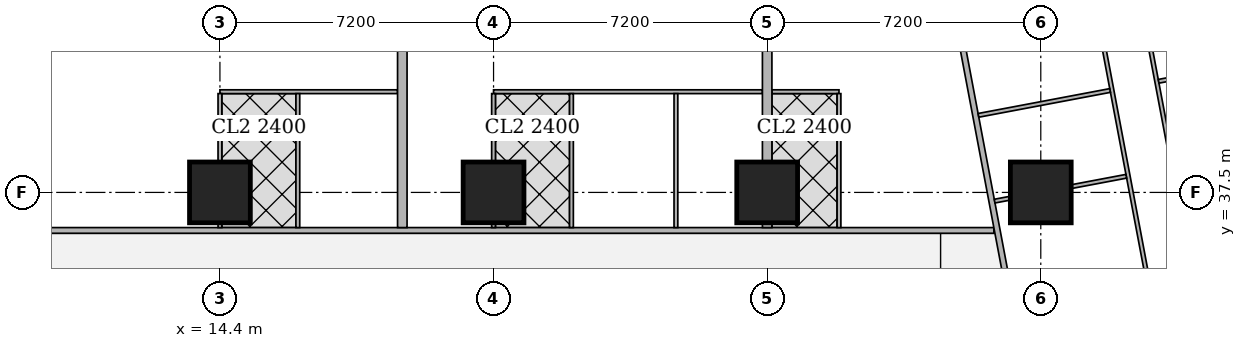
"""IFC4 building model, lengths in metres.
Left out: names, types, materials, properties, quantities, classifications, styles, units other than length and angle.
Written with IfcOpenShell. Run it as: python <this file> out.ifc"""

import sys

from ifc_helpers import new_model, si_unit, direction, frame, frame_2d, origin, origin_2d, place, context, subcontext, project, spatial, rectangle, extrude, element, fill, save


model = new_model("IFC4")
c1 = context("Model", 3, precision=1e-05, world=origin(), true_north=direction((0.0, 1.0)))
c2 = subcontext(c1, "Body", "Model", "MODEL_VIEW")
j1 = project(units=[si_unit("LENGTHUNIT", "METRE"), si_unit("PLANEANGLEUNIT", "RADIAN")], contexts=[c1])
p1 = place(None, origin())
s1 = spatial("IfcSite", under=j1, at=p1, CompositionType="ELEMENT")
p2 = place(p1, origin())
s2 = spatial("IfcBuilding", under=s1, at=p2, CompositionType="ELEMENT")
p3 = place(p2, frame((0.0, 0.0, 111.65)))
s3 = spatial("IfcBuildingStorey", under=s2, at=p3, CompositionType="ELEMENT", Elevation=111.65)
for number, where, z_axis, x_axis in (
    (1, (14.4, 37.5, 0.0), (0.0, 0.0, 1.0), (1.0, 0.0, 0.0)),
    (2, (21.6, 37.5, 0.0), (0.0, 0.0, 1.0), (1.0, 0.0, 0.0)),
    (3, (28.8, 37.5, 0.0), (0.0, 0.0, 1.0), (1.0, 0.0, 0.0)),
    (4, (36.0, 37.5, 0.0), (0.0, 0.0, 1.0), (1.0, 0.0, 0.0)),
):
    element("IfcColumn", number, at=place(p3, frame(where, z_axis=z_axis, x_axis=x_axis)), inside=s3, PredefinedType="COLUMN", context=c2, shape_type="SweptSolid", body=[
        extrude(rectangle(XDim=1.6, YDim=1.6, at=origin_2d()), origin(), (0.0, 0.0, 1.0), 3.75),
    ])
p4 = place(p3, frame((8.35, 36.5, 0.0), z_axis=(0.0, 0.0, 1.0), x_axis=(1.0, 0.0, 0.0)))
e5 = element("IfcWall", 5, at=p4, inside=s3, PredefinedType="SOLIDWALL", context=c2, shape_type="SweptSolid", body=[
    extrude(rectangle(XDim=26.415, YDim=0.15, at=frame_2d((13.208, 0.0))), origin(), (0.0, 0.0, 1.0), 3.5),
])
p5 = place(p4, frame((2.6, 0.0, 0.0)))
e6 = element("IfcOpeningElement", 6, at=p5, cuts=e5, PredefinedType="OPENING", context=c2, shape_type="SweptSolid", body=[
    extrude(rectangle(XDim=1.0, YDim=2.1, at=frame_2d((0.5, 1.05))), frame((0.0, 0.085, 0.0), z_axis=(0.0, -1.0, 0.0), x_axis=(1.0, 0.0, 0.0)), (0.0, 0.0, 1.0), 0.17),
])
p6 = place(p4, frame((10.949, 0.0, 0.0)))
e7 = element("IfcOpeningElement", 7, at=p6, cuts=e5, PredefinedType="OPENING", context=c2, shape_type="SweptSolid", body=[
    extrude(rectangle(XDim=1.0, YDim=2.1, at=frame_2d((0.5, 1.05))), frame((0.0, 0.085, 0.0), z_axis=(0.0, -1.0, 0.0), x_axis=(1.0, 0.0, 0.0)), (0.0, 0.0, 1.0), 0.17),
])
p7 = place(p4, frame((23.923, 0.0, 0.0)))
e8 = element("IfcOpeningElement", 8, at=p7, cuts=e5, PredefinedType="OPENING", context=c2, shape_type="SweptSolid", body=[
    extrude(rectangle(XDim=1.0, YDim=2.1, at=frame_2d((0.5, 1.05))), frame((0.0, 0.085, 0.0), z_axis=(0.0, -1.0, 0.0), x_axis=(1.0, 0.0, 0.0)), (0.0, 0.0, 1.0), 0.17),
])
p8 = place(p3, frame((33.127, 45.65, 0.0), z_axis=(0.0, 0.0, 1.0), x_axis=(0.185598547723, -0.98262565562, 0.0)))
e9 = element("IfcWall", 9, at=p8, inside=s3, PredefinedType="SOLIDWALL", context=c2, shape_type="SweptSolid", body=[
    extrude(rectangle(XDim=47.118, YDim=0.15, at=frame_2d((23.559, 0.0))), origin(), (0.0, 0.0, 1.0), 2.2),
])
p9 = place(p8, frame((20.373, 0.0, 0.0)))
e10 = element("IfcOpeningElement", 10, at=p9, cuts=e9, PredefinedType="OPENING", context=c2, shape_type="SweptSolid", body=[
    extrude(rectangle(XDim=1.0, YDim=2.1, at=frame_2d((0.5, 1.05))), frame((0.0, 0.085, 0.0), z_axis=(0.0, -1.0, 0.0), x_axis=(1.0, 0.0, 0.0)), (0.0, 0.0, 1.0), 0.17),
])
p10 = place(p8, frame((24.188, 0.0, 0.0)))
e11 = element("IfcOpeningElement", 11, at=p10, cuts=e9, PredefinedType="OPENING", context=c2, shape_type="SweptSolid", body=[
    extrude(rectangle(XDim=1.0, YDim=2.1, at=frame_2d((0.5, 1.05))), frame((0.0, 0.085, 0.0), z_axis=(0.0, -1.0, 0.0), x_axis=(1.0, 0.0, 0.0)), (0.0, 0.0, 1.0), 0.17),
])
p11 = place(p8, frame((32.608, 0.0, 0.0)))
e12 = element("IfcOpeningElement", 12, at=p11, cuts=e9, PredefinedType="OPENING", context=c2, shape_type="SweptSolid", body=[
    extrude(rectangle(XDim=1.0, YDim=2.1, at=frame_2d((0.5, 1.05))), frame((0.0, 0.085, 0.0), z_axis=(0.0, -1.0, 0.0), x_axis=(1.0, 0.0, 0.0)), (0.0, 0.0, 1.0), 0.17),
])
p12 = place(p3, frame((38.862, 41.42, 0.0), z_axis=(0.0, 0.0, 1.0), x_axis=(0.185550092293, -0.982634806655, 0.0)))
e13 = element("IfcWall", 13, at=p12, inside=s3, PredefinedType="PARTITIONING", context=c2, shape_type="SweptSolid", body=[
    extrude(rectangle(XDim=12.384, YDim=0.1, at=frame_2d((6.192, 0.0))), origin(), (0.0, 0.0, 1.0), 2.5),
])
p13 = place(p12, frame((11.212, 0.0, 0.0)))
e14 = element("IfcOpeningElement", 14, at=p13, cuts=e13, PredefinedType="OPENING", context=c2, shape_type="SweptSolid", body=[
    extrude(rectangle(XDim=0.9, YDim=2.1, at=frame_2d((0.45, 1.05))), frame((0.0, 0.06, 0.0), z_axis=(0.0, -1.0, 0.0), x_axis=(1.0, 0.0, 0.0)), (0.0, 0.0, 1.0), 0.12),
])
p14 = place(p12, frame((7.555, 0.0, 0.0)))
e15 = element("IfcOpeningElement", 15, at=p14, cuts=e13, PredefinedType="OPENING", context=c2, shape_type="SweptSolid", body=[
    extrude(rectangle(XDim=0.9, YDim=2.1, at=frame_2d((0.45, 1.05))), frame((0.0, 0.06, 0.0), z_axis=(0.0, -1.0, 0.0), x_axis=(1.0, 0.0, 0.0)), (0.0, 0.0, 1.0), 0.12),
])
p15 = place(p12, frame((3.579, 0.0, 0.0)))
e16 = element("IfcOpeningElement", 16, at=p15, cuts=e13, PredefinedType="OPENING", context=c2, shape_type="SweptSolid", body=[
    extrude(rectangle(XDim=0.9, YDim=2.1, at=frame_2d((0.45, 1.05))), frame((0.0, 0.06, 0.0), z_axis=(0.0, -1.0, 0.0), x_axis=(1.0, 0.0, 0.0)), (0.0, 0.0, 1.0), 0.12),
])
p16 = place(p3, frame((37.473, 42.309, 0.0), z_axis=(0.0, 0.0, 1.0), x_axis=(0.185583982986, -0.982628406499, 0.0)))
e17 = element("IfcWall", 17, at=p16, inside=s3, PredefinedType="PARTITIONING", context=c2, shape_type="SweptSolid", body=[
    extrude(rectangle(XDim=14.825, YDim=0.1, at=frame_2d((7.412, 0.0))), origin(), (0.0, 0.0, 1.0), 2.5),
])
p17 = place(p16, frame((13.4, 0.0, 0.0)))
e18 = element("IfcOpeningElement", 18, at=p17, cuts=e17, PredefinedType="OPENING", context=c2, shape_type="SweptSolid", body=[
    extrude(rectangle(XDim=0.9, YDim=2.1, at=frame_2d((0.45, 1.05))), frame((0.0, 0.06, 0.0), z_axis=(0.0, -1.0, 0.0), x_axis=(1.0, 0.0, 0.0)), (0.0, 0.0, 1.0), 0.12),
])
p18 = place(p16, frame((9.808, 0.0, 0.0)))
e19 = element("IfcOpeningElement", 19, at=p18, cuts=e17, PredefinedType="OPENING", context=c2, shape_type="SweptSolid", body=[
    extrude(rectangle(XDim=0.9, YDim=2.1, at=frame_2d((0.45, 1.05))), frame((0.0, 0.06, 0.0), z_axis=(0.0, -1.0, 0.0), x_axis=(1.0, 0.0, 0.0)), (0.0, 0.0, 1.0), 0.12),
])
p19 = place(p16, frame((5.397, 0.0, 0.0)))
e20 = element("IfcOpeningElement", 20, at=p19, cuts=e17, PredefinedType="OPENING", context=c2, shape_type="SweptSolid", body=[
    extrude(rectangle(XDim=0.9, YDim=2.1, at=frame_2d((0.45, 1.05))), frame((0.0, 0.06, 0.0), z_axis=(0.0, -1.0, 0.0), x_axis=(1.0, 0.0, 0.0)), (0.0, 0.0, 1.0), 0.12),
])
p20 = place(p16, frame((2.853, 0.0, 0.0)))
e21 = element("IfcOpeningElement", 21, at=p20, cuts=e17, PredefinedType="OPENING", context=c2, shape_type="SweptSolid", body=[
    extrude(rectangle(XDim=0.9, YDim=2.1, at=frame_2d((0.45, 1.05))), frame((0.0, 0.06, 0.0), z_axis=(0.0, -1.0, 0.0), x_axis=(1.0, 0.0, 0.0)), (0.0, 0.0, 1.0), 0.12),
])
p21 = place(p16, frame((11.491, 0.0, 0.0)))
e22 = element("IfcOpeningElement", 22, at=p21, cuts=e17, PredefinedType="OPENING", context=c2, shape_type="SweptSolid", body=[
    extrude(rectangle(XDim=0.9, YDim=2.1, at=frame_2d((0.45, 1.05))), frame((0.0, 0.06, 0.0), z_axis=(0.0, -1.0, 0.0), x_axis=(1.0, 0.0, 0.0)), (0.0, 0.0, 1.0), 0.12),
])
p22 = place(p16, frame((7.9, 0.0, 0.0)))
e23 = element("IfcOpeningElement", 23, at=p22, cuts=e17, PredefinedType="OPENING", context=c2, shape_type="SweptSolid", body=[
    extrude(rectangle(XDim=0.9, YDim=2.1, at=frame_2d((0.45, 1.05))), frame((0.0, 0.06, 0.0), z_axis=(0.0, -1.0, 0.0), x_axis=(1.0, 0.0, 0.0)), (0.0, 0.0, 1.0), 0.12),
])
p23 = place(p3, frame((43.277, 41.212, 0.0), z_axis=(0.0, 0.0, 1.0), x_axis=(-0.982665405803, -0.185387972203, 0.0)))
e24 = element("IfcWall", 24, at=p23, inside=s3, PredefinedType="PARTITIONING", context=c2, shape_type="SweptSolid", body=[
    extrude(rectangle(XDim=4.25, YDim=0.1, at=frame_2d((2.125, 0.0))), origin(), (0.0, 0.0, 1.0), 2.05),
])
p24 = place(p3, frame((37.824, 40.182, 0.0), z_axis=(0.0, 0.0, 1.0), x_axis=(-0.982648794755, -0.185475998897, 0.0)))
e25 = element("IfcWall", 25, at=p24, inside=s3, PredefinedType="PARTITIONING", context=c2, shape_type="SweptSolid", body=[
    extrude(rectangle(XDim=3.525, YDim=0.1, at=frame_2d((1.763, 0.0))), origin(), (0.0, 0.0, 1.0), 3.5),
])
p25 = place(p3, frame((38.25, 37.925, 0.0), z_axis=(0.0, 0.0, 1.0), x_axis=(-0.982626127294, -0.185596050493, 0.0)))
e26 = element("IfcWall", 26, at=p25, inside=s3, PredefinedType="PARTITIONING", context=c2, shape_type="SweptSolid", body=[
    extrude(rectangle(XDim=1.465, YDim=0.1, at=frame_2d((0.733, 0.0))), origin(), (0.0, 0.0, 1.0), 3.5),
])
p26 = place(p3, frame((35.19, 37.347, 0.0), z_axis=(0.0, 0.0, 1.0), x_axis=(-0.982798158448, -0.184682916784, 0.0)))
e27 = element("IfcWall", 27, at=p26, inside=s3, PredefinedType="PARTITIONING", context=c2, shape_type="SweptSolid", body=[
    extrude(rectangle(XDim=0.411, YDim=0.1, at=frame_2d((0.206, 0.0))), origin(), (0.0, 0.0, 1.0), 3.5),
])
p27 = place(p3, frame((14.4, 40.15, 0.0), z_axis=(0.0, 0.0, 1.0), x_axis=(1.0, 0.0, 0.0)))
e28 = element("IfcWall", 28, at=p27, inside=s3, PredefinedType="PARTITIONING", context=c2, shape_type="SweptSolid", body=[
    extrude(rectangle(XDim=4.674, YDim=0.1, at=frame_2d((2.337, 0.0))), origin(), (0.0, 0.0, 1.0), 3.5),
])
p28 = place(p27, frame((0.575, 0.0, 0.0)))
e29 = element("IfcOpeningElement", 29, at=p28, cuts=e28, PredefinedType="OPENING", context=c2, shape_type="SweptSolid", body=[
    extrude(rectangle(XDim=0.9, YDim=2.1, at=frame_2d((0.45, 1.05))), frame((0.0, 0.06, 0.0), z_axis=(0.0, -1.0, 0.0), x_axis=(1.0, 0.0, 0.0)), (0.0, 0.0, 1.0), 0.12),
])
p29 = place(p27, frame((2.975, 0.0, 0.0)))
e30 = element("IfcOpeningElement", 30, at=p29, cuts=e28, PredefinedType="OPENING", context=c2, shape_type="SweptSolid", body=[
    extrude(rectangle(XDim=0.9, YDim=2.1, at=frame_2d((0.45, 1.05))), frame((0.0, 0.06, 0.0), z_axis=(0.0, -1.0, 0.0), x_axis=(1.0, 0.0, 0.0)), (0.0, 0.0, 1.0), 0.12),
])
p30 = place(p3, frame((14.4, 36.575, 0.0), z_axis=(0.0, 0.0, 1.0), x_axis=(0.0, 1.0, 0.0)))
e31 = element("IfcWall", 31, at=p30, inside=s3, PredefinedType="PARTITIONING", context=c2, shape_type="SweptSolid", body=[
    extrude(rectangle(XDim=0.124, YDim=0.1, at=frame_2d((0.062, 0.0))), origin(), (0.0, 0.0, 1.0), 3.5),
])
p31 = place(p3, frame((14.4, 38.301, 0.0), z_axis=(0.0, 0.0, 1.0), x_axis=(0.0, 1.0, 0.0)))
e32 = element("IfcWall", 32, at=p31, inside=s3, PredefinedType="PARTITIONING", context=c2, shape_type="SweptSolid", body=[
    extrude(rectangle(XDim=1.799, YDim=0.1, at=frame_2d((0.899, 0.0))), origin(), (0.0, 0.0, 1.0), 3.5),
])
p32 = place(p3, frame((16.45, 36.575, 0.0), z_axis=(0.0, 0.0, 1.0), x_axis=(0.0, 1.0, 0.0)))
e33 = element("IfcWall", 33, at=p32, inside=s3, PredefinedType="PARTITIONING", context=c2, shape_type="SweptSolid", body=[
    extrude(rectangle(XDim=3.525, YDim=0.1, at=frame_2d((1.763, 0.0))), origin(), (0.0, 0.0, 1.0), 3.5),
])
p33 = place(p3, frame((21.6, 40.15, 0.0), z_axis=(0.0, 0.0, 1.0), x_axis=(1.0, 0.0, 0.0)))
e34 = element("IfcWall", 34, at=p33, inside=s3, PredefinedType="PARTITIONING", context=c2, shape_type="SweptSolid", body=[
    extrude(rectangle(XDim=7.075, YDim=0.1, at=frame_2d((3.538, 0.0))), origin(), (0.0, 0.0, 1.0), 3.5),
])
p34 = place(p33, frame((0.575, 0.0, 0.0)))
e35 = element("IfcOpeningElement", 35, at=p34, cuts=e34, PredefinedType="OPENING", context=c2, shape_type="SweptSolid", body=[
    extrude(rectangle(XDim=0.9, YDim=2.1, at=frame_2d((0.45, 1.05))), frame((0.0, 0.06, 0.0), z_axis=(0.0, -1.0, 0.0), x_axis=(1.0, 0.0, 0.0)), (0.0, 0.0, 1.0), 0.12),
])
p35 = place(p33, frame((5.549, 0.0, 0.0)))
e36 = element("IfcOpeningElement", 36, at=p35, cuts=e34, PredefinedType="OPENING", context=c2, shape_type="SweptSolid", body=[
    extrude(rectangle(XDim=0.9, YDim=2.1, at=frame_2d((0.45, 1.05))), frame((0.0, 0.06, 0.0), z_axis=(0.0, -1.0, 0.0), x_axis=(1.0, 0.0, 0.0)), (0.0, 0.0, 1.0), 0.12),
])
p36 = place(p33, frame((2.974, 0.0, 0.0)))
e37 = element("IfcOpeningElement", 37, at=p36, cuts=e34, PredefinedType="OPENING", context=c2, shape_type="SweptSolid", body=[
    extrude(rectangle(XDim=0.9, YDim=2.1, at=frame_2d((0.45, 1.05))), frame((0.0, 0.06, 0.0), z_axis=(0.0, -1.0, 0.0), x_axis=(1.0, 0.0, 0.0)), (0.0, 0.0, 1.0), 0.12),
])
p37 = place(p3, frame((21.6, 36.575, 0.0), z_axis=(0.0, 0.0, 1.0), x_axis=(0.0, 1.0, 0.0)))
e38 = element("IfcWall", 38, at=p37, inside=s3, PredefinedType="PARTITIONING", context=c2, shape_type="SweptSolid", body=[
    extrude(rectangle(XDim=0.124, YDim=0.1, at=frame_2d((0.062, 0.0))), origin(), (0.0, 0.0, 1.0), 3.5),
])
p38 = place(p3, frame((21.6, 38.301, 0.0), z_axis=(0.0, 0.0, 1.0), x_axis=(0.0, 1.0, 0.0)))
e39 = element("IfcWall", 39, at=p38, inside=s3, PredefinedType="PARTITIONING", context=c2, shape_type="SweptSolid", body=[
    extrude(rectangle(XDim=1.799, YDim=0.1, at=frame_2d((0.899, 0.0))), origin(), (0.0, 0.0, 1.0), 3.5),
])
for number, where, z_axis, x_axis in (
    (40, (26.399, 36.575, 0.0), (0.0, 0.0, 1.0), (0.0, 1.0, 0.0)),
    (41, (23.65, 36.575, 0.0), (0.0, 0.0, 1.0), (0.0, 1.0, 0.0)),
):
    element("IfcWall", number, at=place(p3, frame(where, z_axis=z_axis, x_axis=x_axis)), inside=s3, PredefinedType="PARTITIONING", context=c2, shape_type="SweptSolid", body=[
        extrude(rectangle(XDim=3.525, YDim=0.1, at=frame_2d((1.763, 0.0))), origin(), (0.0, 0.0, 1.0), 3.5),
    ])
p39 = place(p3, frame((19.199, 36.575, 0.0), z_axis=(0.0, 0.0, 1.0), x_axis=(0.0, 1.0, 0.0)))
e42 = element("IfcWall", 42, at=p39, inside=s3, PredefinedType="SOLIDWALL", context=c2, shape_type="SweptSolid", body=[
    extrude(rectangle(XDim=4.775, YDim=0.25, at=frame_2d((2.388, 0.0))), origin(), (0.0, 0.0, 1.0), 3.5),
])
p40 = place(p3, frame((28.925, 40.15, 0.0), z_axis=(0.0, 0.0, 1.0), x_axis=(1.0, 0.0, 0.0)))
e43 = element("IfcWall", 43, at=p40, inside=s3, PredefinedType="PARTITIONING", context=c2, shape_type="SweptSolid", body=[
    extrude(rectangle(XDim=1.765, YDim=0.1, at=frame_2d((0.882, 0.0))), origin(), (0.0, 0.0, 1.0), 3.5),
])
p41 = place(p40, frame((0.375, 0.0, 0.0)))
e44 = element("IfcOpeningElement", 44, at=p41, cuts=e43, PredefinedType="OPENING", context=c2, shape_type="SweptSolid", body=[
    extrude(rectangle(XDim=0.9, YDim=2.1, at=frame_2d((0.45, 1.05))), frame((0.0, 0.06, 0.0), z_axis=(0.0, -1.0, 0.0), x_axis=(1.0, 0.0, 0.0)), (0.0, 0.0, 1.0), 0.12),
])
p42 = place(p3, frame((30.69, 36.575, 0.0), z_axis=(0.0, 0.0, 1.0), x_axis=(0.0, 1.0, 0.0)))
e45 = element("IfcWall", 45, at=p42, inside=s3, PredefinedType="PARTITIONING", context=c2, shape_type="SweptSolid", body=[
    extrude(rectangle(XDim=3.525, YDim=0.1, at=frame_2d((1.763, 0.0))), origin(), (0.0, 0.0, 1.0), 3.5),
])
p43 = place(p3, frame((28.8, 36.575, 0.0), z_axis=(0.0, 0.0, 1.0), x_axis=(0.0, 1.0, 0.0)))
e46 = element("IfcWall", 46, at=p43, inside=s3, PredefinedType="SOLIDWALL", context=c2, shape_type="SweptSolid", body=[
    extrude(rectangle(XDim=0.124, YDim=0.25, at=frame_2d((0.062, 0.0))), origin(), (0.0, 0.0, 1.0), 3.5),
])
p44 = place(p3, frame((28.8, 38.301, 0.0), z_axis=(0.0, 0.0, 1.0), x_axis=(0.0, 1.0, 0.0)))
e47 = element("IfcWall", 47, at=p44, inside=s3, PredefinedType="SOLIDWALL", context=c2, shape_type="SweptSolid", body=[
    extrude(rectangle(XDim=3.049, YDim=0.25, at=frame_2d((1.524, 0.0))), origin(), (0.0, 0.0, 1.0), 3.5),
])
p45 = place(p19, origin())
e48 = element("IfcDoor", 48, at=p45, inside=s3, OperationType="SINGLE_SWING_LEFT", PredefinedType="DOOR", context=c2, shape_type="SweptSolid", body=[
    extrude(rectangle(XDim=0.9, YDim=2.1, at=frame_2d((0.45, 1.05))), frame((0.0, 0.025, 0.0), z_axis=(0.0, -1.0, 0.0), x_axis=(1.0, 0.0, 0.0)), (0.0, 0.0, 1.0), 0.05),
])
fill(e20, e48)
p46 = place(p20, origin())
e49 = element("IfcDoor", 49, at=p46, inside=s3, OperationType="SINGLE_SWING_RIGHT", PredefinedType="DOOR", context=c2, shape_type="SweptSolid", body=[
    extrude(rectangle(XDim=0.9, YDim=2.1, at=frame_2d((0.45, 1.05))), frame((0.0, 0.025, 0.0), z_axis=(0.0, -1.0, 0.0), x_axis=(1.0, 0.0, 0.0)), (0.0, 0.0, 1.0), 0.05),
])
fill(e21, e49)
p47 = place(p28, origin())
e50 = element("IfcDoor", 50, at=p47, inside=s3, OperationType="SINGLE_SWING_RIGHT", PredefinedType="DOOR", context=c2, shape_type="SweptSolid", body=[
    extrude(rectangle(XDim=0.9, YDim=2.1, at=frame_2d((0.45, 1.05))), frame((0.0, 0.025, 0.0), z_axis=(0.0, -1.0, 0.0), x_axis=(1.0, 0.0, 0.0)), (0.0, 0.0, 1.0), 0.05),
])
fill(e29, e50)
p48 = place(p29, origin())
e51 = element("IfcDoor", 51, at=p48, inside=s3, OperationType="SINGLE_SWING_LEFT", PredefinedType="DOOR", context=c2, shape_type="SweptSolid", body=[
    extrude(rectangle(XDim=0.9, YDim=2.1, at=frame_2d((0.45, 1.05))), frame((0.0, 0.025, 0.0), z_axis=(0.0, -1.0, 0.0), x_axis=(1.0, 0.0, 0.0)), (0.0, 0.0, 1.0), 0.05),
])
fill(e30, e51)
p49 = place(p5, origin())
e52 = element("IfcDoor", 52, at=p49, inside=s3, OperationType="SINGLE_SWING_LEFT", PredefinedType="DOOR", context=c2, shape_type="SweptSolid", body=[
    extrude(rectangle(XDim=1.0, YDim=2.1, at=frame_2d((0.5, 1.05))), frame((0.0, 0.025, 0.0), z_axis=(0.0, -1.0, 0.0), x_axis=(1.0, 0.0, 0.0)), (0.0, 0.0, 1.0), 0.05),
])
fill(e6, e52)
p50 = place(p34, origin())
e53 = element("IfcDoor", 53, at=p50, inside=s3, OperationType="SINGLE_SWING_RIGHT", PredefinedType="DOOR", context=c2, shape_type="SweptSolid", body=[
    extrude(rectangle(XDim=0.9, YDim=2.1, at=frame_2d((0.45, 1.05))), frame((0.0, 0.025, 0.0), z_axis=(0.0, -1.0, 0.0), x_axis=(1.0, 0.0, 0.0)), (0.0, 0.0, 1.0), 0.05),
])
fill(e35, e53)
p51 = place(p35, origin())
e54 = element("IfcDoor", 54, at=p51, inside=s3, OperationType="SINGLE_SWING_LEFT", PredefinedType="DOOR", context=c2, shape_type="SweptSolid", body=[
    extrude(rectangle(XDim=0.9, YDim=2.1, at=frame_2d((0.45, 1.05))), frame((0.0, 0.025, 0.0), z_axis=(0.0, -1.0, 0.0), x_axis=(1.0, 0.0, 0.0)), (0.0, 0.0, 1.0), 0.05),
])
fill(e36, e54)
p52 = place(p36, origin())
e55 = element("IfcDoor", 55, at=p52, inside=s3, OperationType="SINGLE_SWING_LEFT", PredefinedType="DOOR", context=c2, shape_type="SweptSolid", body=[
    extrude(rectangle(XDim=0.9, YDim=2.1, at=frame_2d((0.45, 1.05))), frame((0.0, 0.025, 0.0), z_axis=(0.0, -1.0, 0.0), x_axis=(1.0, 0.0, 0.0)), (0.0, 0.0, 1.0), 0.05),
])
fill(e37, e55)
p53 = place(p6, origin())
e56 = element("IfcDoor", 56, at=p53, inside=s3, OperationType="SINGLE_SWING_LEFT", PredefinedType="DOOR", context=c2, shape_type="SweptSolid", body=[
    extrude(rectangle(XDim=1.0, YDim=2.1, at=frame_2d((0.5, 1.05))), frame((0.0, 0.025, 0.0), z_axis=(0.0, -1.0, 0.0), x_axis=(1.0, 0.0, 0.0)), (0.0, 0.0, 1.0), 0.05),
])
fill(e7, e56)
p54 = place(p41, origin())
e57 = element("IfcDoor", 57, at=p54, inside=s3, OperationType="SINGLE_SWING_RIGHT", PredefinedType="DOOR", context=c2, shape_type="SweptSolid", body=[
    extrude(rectangle(XDim=0.9, YDim=2.1, at=frame_2d((0.45, 1.05))), frame((0.0, 0.025, 0.0), z_axis=(0.0, -1.0, 0.0), x_axis=(1.0, 0.0, 0.0)), (0.0, 0.0, 1.0), 0.05),
])
fill(e44, e57)
p55 = place(p7, origin())
e58 = element("IfcDoor", 58, at=p55, inside=s3, OperationType="SINGLE_SWING_RIGHT", PredefinedType="DOOR", context=c2, shape_type="SweptSolid", body=[
    extrude(rectangle(XDim=1.0, YDim=2.1, at=frame_2d((0.5, 1.05))), frame((0.0, 0.025, 0.0), z_axis=(0.0, -1.0, 0.0), x_axis=(1.0, 0.0, 0.0)), (0.0, 0.0, 1.0), 0.05),
])
fill(e8, e58)
save(model, sys.argv[1])
